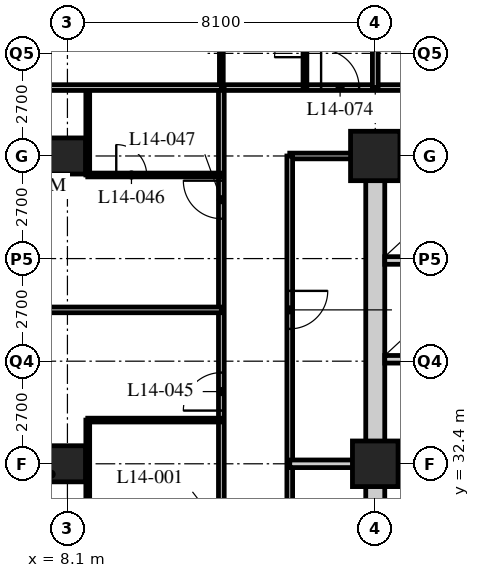
"""IFC4 building model, lengths in metres.
Left out: names, types, materials, properties, quantities, classifications, styles, units other than length and angle.
Written with IfcOpenShell. Run it as: python <this file> out.ifc"""

import sys

from ifc_helpers import new_model, si_unit, direction, frame, frame_2d, origin, origin_2d, place, context, subcontext, project, spatial, rectangle, hollow_rectangle, extrude, element, fill, save


model = new_model("IFC4")
c1 = context("Model", 3, precision=1e-05, world=origin(), true_north=direction((0.0, 1.0)))
c2 = subcontext(c1, "Body", "Model", "MODEL_VIEW")
j1 = project(units=[si_unit("LENGTHUNIT", "METRE"), si_unit("PLANEANGLEUNIT", "RADIAN")], contexts=[c1])
p1 = place(None, origin())
s1 = spatial("IfcSite", under=j1, at=p1, CompositionType="ELEMENT")
p2 = place(p1, origin())
s2 = spatial("IfcBuilding", under=s1, at=p2, CompositionType="ELEMENT")
p3 = place(p2, frame((0.0, 0.0, 60.2)))
s3 = spatial("IfcBuildingStorey", under=s2, at=p3, CompositionType="ELEMENT", Elevation=60.2)
for number, where, z_axis, x_axis in (
    (1, (8.1, 32.4, 0.0), (0.0, 0.0, 1.0), (1.0, 0.0, 0.0)),
    (2, (8.1, 40.5, 0.0), (0.0, 0.0, 1.0), (1.0, 0.0, 0.0)),
):
    element("IfcColumn", number, at=place(p3, frame(where, z_axis=z_axis, x_axis=x_axis)), inside=s3, PredefinedType="COLUMN", context=c2, shape_type="SweptSolid", body=[
        extrude(hollow_rectangle(XDim=0.95, YDim=0.95, WallThickness=0.095, at=origin_2d()), origin(), (0.0, 0.0, 1.0), 3.4),
    ])
p4 = place(p3, frame((16.2, 32.4, 0.0), z_axis=(0.0, 0.0, 1.0), x_axis=(1.0, 0.0, 0.0)))
e3 = element("IfcColumn", 3, at=p4, inside=s3, PredefinedType="COLUMN", context=c2, shape_type="SweptSolid", body=[
    extrude(hollow_rectangle(XDim=1.2, YDim=1.2, WallThickness=0.12, at=origin_2d()), origin(), (0.0, 0.0, 1.0), 3.4),
])
p5 = place(p3, frame((16.2, 40.5, 0.0), z_axis=(0.0, 0.0, 1.0), x_axis=(1.0, 0.0, 0.0)))
e4 = element("IfcColumn", 4, at=p5, inside=s3, PredefinedType="COLUMN", context=c2, shape_type="SweptSolid", body=[
    extrude(hollow_rectangle(XDim=1.3, YDim=1.3, WallThickness=0.13, at=origin_2d()), origin(), (0.0, 0.0, 1.0), 3.4),
])
p6 = place(p3, frame((12.15, 42.3, 0.0), z_axis=(0.0, 0.0, 1.0), x_axis=(1.0, 0.0, 0.0)))
e5 = element("IfcWall", 5, at=p6, inside=s3, PredefinedType="PARTITIONING", context=c2, shape_type="SweptSolid", body=[
    extrude(rectangle(XDim=32.4, YDim=0.15, at=frame_2d((16.2, 0.0))), origin(), (0.0, 0.0, 1.0), 3.19),
])
p7 = place(p6, frame((6.5, 0.0, 0.0)))
e6 = element("IfcOpeningElement", 6, at=p7, cuts=e5, PredefinedType="OPENING", context=c2, shape_type="SweptSolid", body=[
    extrude(rectangle(XDim=1.0, YDim=2.1, at=frame_2d((0.5, 1.05))), frame((0.0, 0.085, 0.0), z_axis=(0.0, -1.0, 0.0), x_axis=(1.0, 0.0, 0.0)), (0.0, 0.0, 1.0), 0.17),
])
p8 = place(p6, frame((10.55, 0.0, 0.0)))
e7 = element("IfcOpeningElement", 7, at=p8, cuts=e5, PredefinedType="OPENING", context=c2, shape_type="SweptSolid", body=[
    extrude(rectangle(XDim=1.0, YDim=2.1, at=frame_2d((0.5, 1.05))), frame((0.0, 0.085, 0.0), z_axis=(0.0, -1.0, 0.0), x_axis=(1.0, 0.0, 0.0)), (0.0, 0.0, 1.0), 0.17),
])
p9 = place(p6, frame((14.6, 0.0, 0.0)))
e8 = element("IfcOpeningElement", 8, at=p9, cuts=e5, PredefinedType="OPENING", context=c2, shape_type="SweptSolid", body=[
    extrude(rectangle(XDim=1.0, YDim=2.1, at=frame_2d((0.5, 1.05))), frame((0.0, 0.085, 0.0), z_axis=(0.0, -1.0, 0.0), x_axis=(1.0, 0.0, 0.0)), (0.0, 0.0, 1.0), 0.17),
])
p10 = place(p6, frame((18.65, 0.0, 0.0)))
e9 = element("IfcOpeningElement", 9, at=p10, cuts=e5, PredefinedType="OPENING", context=c2, shape_type="SweptSolid", body=[
    extrude(rectangle(XDim=1.0, YDim=2.1, at=frame_2d((0.5, 1.05))), frame((0.0, 0.085, 0.0), z_axis=(0.0, -1.0, 0.0), x_axis=(1.0, 0.0, 0.0)), (0.0, 0.0, 1.0), 0.17),
])
p11 = place(p6, frame((22.7, 0.0, 0.0)))
e10 = element("IfcOpeningElement", 10, at=p11, cuts=e5, PredefinedType="OPENING", context=c2, shape_type="SweptSolid", body=[
    extrude(rectangle(XDim=1.0, YDim=2.1, at=frame_2d((0.5, 1.05))), frame((0.0, 0.085, 0.0), z_axis=(0.0, -1.0, 0.0), x_axis=(1.0, 0.0, 0.0)), (0.0, 0.0, 1.0), 0.17),
])
p12 = place(p6, frame((26.75, 0.0, 0.0)))
e11 = element("IfcOpeningElement", 11, at=p12, cuts=e5, PredefinedType="OPENING", context=c2, shape_type="SweptSolid", body=[
    extrude(rectangle(XDim=1.0, YDim=2.1, at=frame_2d((0.5, 1.05))), frame((0.0, 0.085, 0.0), z_axis=(0.0, -1.0, 0.0), x_axis=(1.0, 0.0, 0.0)), (0.0, 0.0, 1.0), 0.17),
])
p13 = place(p6, frame((28.775, 0.0, 0.0)))
e12 = element("IfcOpeningElement", 12, at=p13, cuts=e5, PredefinedType="OPENING", context=c2, shape_type="SweptSolid", body=[
    extrude(rectangle(XDim=1.0, YDim=2.1, at=frame_2d((0.5, 1.05))), frame((0.0, 0.085, 0.0), z_axis=(0.0, -1.0, 0.0), x_axis=(1.0, 0.0, 0.0)), (0.0, 0.0, 1.0), 0.17),
])
p14 = place(p6, frame((2.625, 0.0, 0.0)))
e13 = element("IfcOpeningElement", 13, at=p14, cuts=e5, PredefinedType="OPENING", context=c2, shape_type="SweptSolid", body=[
    extrude(rectangle(XDim=1.0, YDim=2.1, at=frame_2d((0.5, 1.05))), frame((0.0, 0.085, 0.0), z_axis=(0.0, -1.0, 0.0), x_axis=(1.0, 0.0, 0.0)), (0.0, 0.0, 1.0), 0.17),
])
p15 = place(p3, frame((12.15, 12.15, 0.0), z_axis=(0.0, 0.0, 1.0), x_axis=(0.0, 1.0, 0.0)))
e14 = element("IfcWall", 14, at=p15, inside=s3, PredefinedType="PARTITIONING", context=c2, shape_type="SweptSolid", body=[
    extrude(rectangle(XDim=30.15, YDim=0.15, at=frame_2d((15.075, 0.0))), origin(), (0.0, 0.0, 1.0), 3.19),
])
p16 = place(p15, frame((2.45, 0.0, 0.0)))
e15 = element("IfcOpeningElement", 15, at=p16, cuts=e14, PredefinedType="OPENING", context=c2, shape_type="SweptSolid", body=[
    extrude(rectangle(XDim=1.0, YDim=2.1, at=frame_2d((0.5, 1.05))), frame((0.0, 0.085, 0.0), z_axis=(0.0, -1.0, 0.0), x_axis=(1.0, 0.0, 0.0)), (0.0, 0.0, 1.0), 0.17),
])
p17 = place(p15, frame((6.5, 0.0, 0.0)))
e16 = element("IfcOpeningElement", 16, at=p17, cuts=e14, PredefinedType="OPENING", context=c2, shape_type="SweptSolid", body=[
    extrude(rectangle(XDim=1.0, YDim=2.1, at=frame_2d((0.5, 1.05))), frame((0.0, 0.085, 0.0), z_axis=(0.0, -1.0, 0.0), x_axis=(1.0, 0.0, 0.0)), (0.0, 0.0, 1.0), 0.17),
])
p18 = place(p15, frame((10.55, 0.0, 0.0)))
e17 = element("IfcOpeningElement", 17, at=p18, cuts=e14, PredefinedType="OPENING", context=c2, shape_type="SweptSolid", body=[
    extrude(rectangle(XDim=1.0, YDim=2.1, at=frame_2d((0.5, 1.05))), frame((0.0, 0.085, 0.0), z_axis=(0.0, -1.0, 0.0), x_axis=(1.0, 0.0, 0.0)), (0.0, 0.0, 1.0), 0.17),
])
p19 = place(p15, frame((14.6, 0.0, 0.0)))
e18 = element("IfcOpeningElement", 18, at=p19, cuts=e14, PredefinedType="OPENING", context=c2, shape_type="SweptSolid", body=[
    extrude(rectangle(XDim=1.0, YDim=2.1, at=frame_2d((0.5, 1.05))), frame((0.0, 0.085, 0.0), z_axis=(0.0, -1.0, 0.0), x_axis=(1.0, 0.0, 0.0)), (0.0, 0.0, 1.0), 0.17),
])
p20 = place(p15, frame((21.65, 0.0, 0.0)))
e19 = element("IfcOpeningElement", 19, at=p20, cuts=e14, PredefinedType="OPENING", context=c2, shape_type="SweptSolid", body=[
    extrude(rectangle(XDim=1.0, YDim=2.1, at=frame_2d((0.5, 1.05))), frame((0.0, 0.085, 0.0), z_axis=(0.0, -1.0, 0.0), x_axis=(1.0, 0.0, 0.0)), (0.0, 0.0, 1.0), 0.17),
])
p21 = place(p15, frame((26.7, 0.0, 0.0)))
e20 = element("IfcOpeningElement", 20, at=p21, cuts=e14, PredefinedType="OPENING", context=c2, shape_type="SweptSolid", body=[
    extrude(rectangle(XDim=1.0, YDim=2.1, at=frame_2d((0.5, 1.05))), frame((0.0, 0.085, 0.0), z_axis=(0.0, -1.0, 0.0), x_axis=(1.0, 0.0, 0.0)), (0.0, 0.0, 1.0), 0.17),
])
p22 = place(p3, frame((16.0, 40.5, 0.0), z_axis=(0.0, 0.0, 1.0), x_axis=(-1.0, 0.0, 0.0)))
e21 = element("IfcWall", 21, at=p22, inside=s3, PredefinedType="PARTITIONING", context=c2, shape_type="SweptSolid", body=[
    extrude(rectangle(XDim=2.05, YDim=0.15, at=frame_2d((1.025, 0.0))), origin(), (0.0, 0.0, 1.0), 2.578),
])
p23 = place(p3, frame((13.95, 40.5, 0.0), z_axis=(0.0, 0.0, 1.0), x_axis=(0.0, -1.0, 0.0)))
e22 = element("IfcWall", 22, at=p23, inside=s3, PredefinedType="PARTITIONING", context=c2, shape_type="SweptSolid", body=[
    extrude(rectangle(XDim=26.55, YDim=0.15, at=frame_2d((13.275, 0.0))), origin(), (0.0, 0.0, 1.0), 3.19),
])
p24 = place(p23, frame((11.65, 0.0, 0.0)))
e23 = element("IfcOpeningElement", 23, at=p24, cuts=e22, PredefinedType="OPENING", context=c2, shape_type="SweptSolid", body=[
    extrude(rectangle(XDim=1.0, YDim=2.1, at=frame_2d((0.5, 1.05))), frame((0.0, 0.085, 0.0), z_axis=(0.0, -1.0, 0.0), x_axis=(1.0, 0.0, 0.0)), (0.0, 0.0, 1.0), 0.17),
])
p25 = place(p23, frame((3.55, 0.0, 0.0)))
e24 = element("IfcOpeningElement", 24, at=p25, cuts=e22, PredefinedType="OPENING", context=c2, shape_type="SweptSolid", body=[
    extrude(rectangle(XDim=1.0, YDim=2.1, at=frame_2d((0.5, 1.05))), frame((0.0, 0.085, 0.0), z_axis=(0.0, -1.0, 0.0), x_axis=(1.0, 0.0, 0.0)), (0.0, 0.0, 1.0), 0.17),
])
p26 = place(p3, frame((13.95, 32.4, 0.0), z_axis=(0.0, 0.0, 1.0), x_axis=(1.0, 0.0, 0.0)))
e25 = element("IfcWall", 25, at=p26, inside=s3, PredefinedType="SOLIDWALL", context=c2, shape_type="SweptSolid", body=[
    extrude(rectangle(XDim=2.25, YDim=0.2, at=frame_2d((1.125, 0.0))), origin(), (0.0, 0.0, 1.0), 2.578),
])
p27 = place(p3, frame((8.635, 30.15, 0.0), z_axis=(0.0, 0.0, 1.0), x_axis=(0.0, 1.0, 0.0)))
e26 = element("IfcWall", 26, at=p27, inside=s3, PredefinedType="PARTITIONING", context=c2, shape_type="SweptSolid", body=[
    extrude(rectangle(XDim=3.4, YDim=0.1, at=frame_2d((1.7, 0.0))), origin(), (0.0, 0.0, 1.0), 3.19),
])
p28 = place(p27, frame((0.488, 0.0, 0.0)))
e27 = element("IfcOpeningElement", 27, at=p28, cuts=e26, PredefinedType="OPENING", context=c2, shape_type="SweptSolid", body=[
    extrude(rectangle(XDim=0.8, YDim=2.1, at=frame_2d((0.4, 1.05))), frame((0.0, 0.06, 0.0), z_axis=(0.0, -1.0, 0.0), x_axis=(1.0, 0.0, 0.0)), (0.0, 0.0, 1.0), 0.12),
])
p29 = place(p3, frame((12.15, 33.55, 0.0), z_axis=(0.0, 0.0, 1.0), x_axis=(-1.0, 0.0, 0.0)))
e28 = element("IfcWall", 28, at=p29, inside=s3, PredefinedType="PARTITIONING", context=c2, shape_type="SweptSolid", body=[
    extrude(rectangle(XDim=3.515, YDim=0.1, at=frame_2d((1.757, 0.0))), origin(), (0.0, 0.0, 1.0), 3.19),
])
p30 = place(p3, frame((12.15, 36.45, 0.0), z_axis=(0.0, 0.0, 1.0), x_axis=(-1.0, 0.0, 0.0)))
e29 = element("IfcWall", 29, at=p30, inside=s3, PredefinedType="PARTITIONING", context=c2, shape_type="SweptSolid", body=[
    extrude(rectangle(XDim=11.85, YDim=0.15, at=frame_2d((5.925, 0.0))), origin(), (0.0, 0.0, 1.0), 3.19),
])
p31 = place(p3, frame((8.635, 40.0, 0.0), z_axis=(0.0, 0.0, 1.0), x_axis=(0.0, 1.0, 0.0)))
e30 = element("IfcWall", 30, at=p31, inside=s3, PredefinedType="PARTITIONING", context=c2, shape_type="SweptSolid", body=[
    extrude(rectangle(XDim=2.3, YDim=0.1, at=frame_2d((1.15, 0.0))), origin(), (0.0, 0.0, 1.0), 3.19),
])
p32 = place(p3, frame((12.15, 40.0, 0.0), z_axis=(0.0, 0.0, 1.0), x_axis=(-1.0, 0.0, 0.0)))
e31 = element("IfcWall", 31, at=p32, inside=s3, PredefinedType="PARTITIONING", context=c2, shape_type="SweptSolid", body=[
    extrude(rectangle(XDim=3.515, YDim=0.1, at=frame_2d((1.757, 0.0))), origin(), (0.0, 0.0, 1.0), 3.19),
])
p33 = place(p32, frame((1.965, 0.0, 0.0)))
e32 = element("IfcOpeningElement", 32, at=p33, cuts=e31, PredefinedType="OPENING", context=c2, shape_type="SweptSolid", body=[
    extrude(rectangle(XDim=0.8, YDim=2.1, at=frame_2d((0.4, 1.05))), frame((0.0, 0.06, 0.0), z_axis=(0.0, -1.0, 0.0), x_axis=(1.0, 0.0, 0.0)), (0.0, 0.0, 1.0), 0.12),
])
p34 = place(p3, frame((14.35, 42.3, 0.0), z_axis=(0.0, 0.0, 1.0), x_axis=(0.0, 1.0, 0.0)))
e33 = element("IfcWall", 33, at=p34, inside=s3, PredefinedType="PARTITIONING", context=c2, shape_type="SweptSolid", body=[
    extrude(rectangle(XDim=2.4, YDim=0.1, at=frame_2d((1.2, 0.0))), origin(), (0.0, 0.0, 1.0), 3.19),
])
p35 = place(p34, frame((0.8, 0.0, 0.0)))
e34 = element("IfcOpeningElement", 34, at=p35, cuts=e33, PredefinedType="OPENING", context=c2, shape_type="SweptSolid", body=[
    extrude(rectangle(XDim=0.8, YDim=2.1, at=frame_2d((0.4, 1.05))), frame((0.0, 0.06, 0.0), z_axis=(0.0, -1.0, 0.0), x_axis=(1.0, 0.0, 0.0)), (0.0, 0.0, 1.0), 0.12),
])
p36 = place(p3, frame((12.15, 42.3, 0.0), z_axis=(0.0, 0.0, 1.0), x_axis=(0.0, 1.0, 0.0)))
e35 = element("IfcWall", 35, at=p36, inside=s3, PredefinedType="PARTITIONING", context=c2, shape_type="SweptSolid", body=[
    extrude(rectangle(XDim=2.4, YDim=0.1, at=frame_2d((1.2, 0.0))), origin(), (0.0, 0.0, 1.0), 3.19),
])
p37 = place(p3, frame((4.35, 42.3, 0.0), z_axis=(0.0, 0.0, 1.0), x_axis=(1.0, 0.0, 0.0)))
e36 = element("IfcWall", 36, at=p37, inside=s3, PredefinedType="PARTITIONING", context=c2, shape_type="SweptSolid", body=[
    extrude(rectangle(XDim=7.8, YDim=0.15, at=frame_2d((3.9, 0.0))), origin(), (0.0, 0.0, 1.0), 3.19),
])
p38 = place(p3, frame((16.2, 42.3, 0.0), z_axis=(0.0, 0.0, 1.0), x_axis=(0.0, 1.0, 0.0)))
e37 = element("IfcWall", 37, at=p38, inside=s3, PredefinedType="PARTITIONING", context=c2, shape_type="SweptSolid", body=[
    extrude(rectangle(XDim=6.0, YDim=0.15, at=frame_2d((3.0, 0.0))), origin(), (0.0, 0.0, 1.0), 2.578),
])
p39 = place(p3, frame((15.95, 40.5, 0.0), z_axis=(0.0, 0.0, 1.0), x_axis=(1.0, 0.0, 0.0)))
e38 = element("IfcWall", 38, at=p39, inside=s3, PredefinedType="SOLIDWALL", context=c2, shape_type="SweptSolid", body=[
    extrude(rectangle(XDim=24.8, YDim=0.5, at=frame_2d((12.4, 0.0))), origin(), (0.0, 0.0, 1.0), 2.54),
])
p40 = place(p39, frame((11.5, 0.0, 0.0)))
e39 = element("IfcOpeningElement", 39, at=p40, cuts=e38, PredefinedType="OPENING", context=c2, shape_type="SweptSolid", body=[
    extrude(rectangle(XDim=1.8, YDim=2.4, at=frame_2d((0.9, 1.2))), frame((0.0, 0.26, 0.0), z_axis=(0.0, -1.0, 0.0), x_axis=(1.0, 0.0, 0.0)), (0.0, 0.0, 1.0), 0.52),
])
p41 = place(p3, frame((16.2, 24.55, 0.0), z_axis=(0.0, 0.0, 1.0), x_axis=(0.0, 1.0, 0.0)))
e40 = element("IfcWall", 40, at=p41, inside=s3, PredefinedType="SOLIDWALL", context=c2, shape_type="SweptSolid", body=[
    extrude(rectangle(XDim=15.7, YDim=0.5, at=frame_2d((7.85, 0.0))), origin(), (0.0, 0.0, 1.0), 2.578),
])
p42 = place(p3, frame((16.45, 32.4, 0.0), z_axis=(0.0, 0.0, 1.0), x_axis=(1.0, 0.0, 0.0)))
e41 = element("IfcWall", 41, at=p42, inside=s3, PredefinedType="SOLIDWALL", context=c2, shape_type="SweptSolid", body=[
    extrude(rectangle(XDim=7.95, YDim=0.2, at=frame_2d((3.975, 0.0))), origin(), (0.0, 0.0, 1.0), 2.578),
])
for number, where, z_axis, x_axis in (
    (42, (16.45, 35.15, 0.0), (0.0, 0.0, 1.0), (1.0, 0.0, 0.0)),
    (43, (16.45, 37.75, 0.0), (0.0, 0.0, 1.0), (1.0, 0.0, 0.0)),
):
    element("IfcWall", number, at=place(p3, frame(where, z_axis=z_axis, x_axis=x_axis)), inside=s3, PredefinedType="SOLIDWALL", context=c2, shape_type="SweptSolid", body=[
        extrude(rectangle(XDim=2.6, YDim=0.2, at=frame_2d((1.3, 0.0))), origin(), (0.0, 0.0, 1.0), 3.19),
    ])
p43 = place(p25, origin())
e44 = element("IfcDoor", 44, at=p43, inside=s3, OperationType="SINGLE_SWING_LEFT", PredefinedType="DOOR", context=c2, shape_type="SweptSolid", body=[
    extrude(rectangle(XDim=1.0, YDim=2.1, at=frame_2d((0.5, 1.05))), frame((0.0, 0.025, 0.0), z_axis=(0.0, -1.0, 0.0), x_axis=(1.0, 0.0, 0.0)), (0.0, 0.0, 1.0), 0.05),
])
fill(e24, e44)
p44 = place(p20, origin())
e45 = element("IfcDoor", 45, at=p44, inside=s3, OperationType="SINGLE_SWING_LEFT", PredefinedType="DOOR", context=c2, shape_type="SweptSolid", body=[
    extrude(rectangle(XDim=1.0, YDim=2.1, at=frame_2d((0.5, 1.05))), frame((0.0, 0.025, 0.0), z_axis=(0.0, -1.0, 0.0), x_axis=(1.0, 0.0, 0.0)), (0.0, 0.0, 1.0), 0.05),
])
fill(e19, e45)
p45 = place(p33, origin())
e46 = element("IfcDoor", 46, at=p45, inside=s3, OperationType="SINGLE_SWING_LEFT", PredefinedType="DOOR", context=c2, shape_type="SweptSolid", body=[
    extrude(rectangle(XDim=0.8, YDim=2.1, at=frame_2d((0.4, 1.05))), frame((0.0, 0.025, 0.0), z_axis=(0.0, -1.0, 0.0), x_axis=(1.0, 0.0, 0.0)), (0.0, 0.0, 1.0), 0.05),
])
fill(e32, e46)
p46 = place(p21, origin())
e47 = element("IfcDoor", 47, at=p46, inside=s3, OperationType="SINGLE_SWING_RIGHT", PredefinedType="DOOR", context=c2, shape_type="SweptSolid", body=[
    extrude(rectangle(XDim=1.0, YDim=2.1, at=frame_2d((0.5, 1.05))), frame((0.0, 0.025, 0.0), z_axis=(0.0, -1.0, 0.0), x_axis=(1.0, 0.0, 0.0)), (0.0, 0.0, 1.0), 0.05),
])
fill(e20, e47)
p47 = place(p35, origin())
e48 = element("IfcDoor", 48, at=p47, inside=s3, OperationType="SINGLE_SWING_LEFT", PredefinedType="DOOR", context=c2, shape_type="SweptSolid", body=[
    extrude(rectangle(XDim=0.8, YDim=2.1, at=frame_2d((0.4, 1.05))), frame((0.0, 0.025, 0.0), z_axis=(0.0, -1.0, 0.0), x_axis=(1.0, 0.0, 0.0)), (0.0, 0.0, 1.0), 0.05),
])
fill(e34, e48)
p48 = place(p14, origin())
e49 = element("IfcDoor", 49, at=p48, inside=s3, OperationType="SINGLE_SWING_LEFT", PredefinedType="DOOR", context=c2, shape_type="SweptSolid", body=[
    extrude(rectangle(XDim=1.0, YDim=2.1, at=frame_2d((0.5, 1.05))), frame((0.0, 0.025, 0.0), z_axis=(0.0, -1.0, 0.0), x_axis=(1.0, 0.0, 0.0)), (0.0, 0.0, 1.0), 0.05),
])
fill(e13, e49)
save(model, sys.argv[1])
